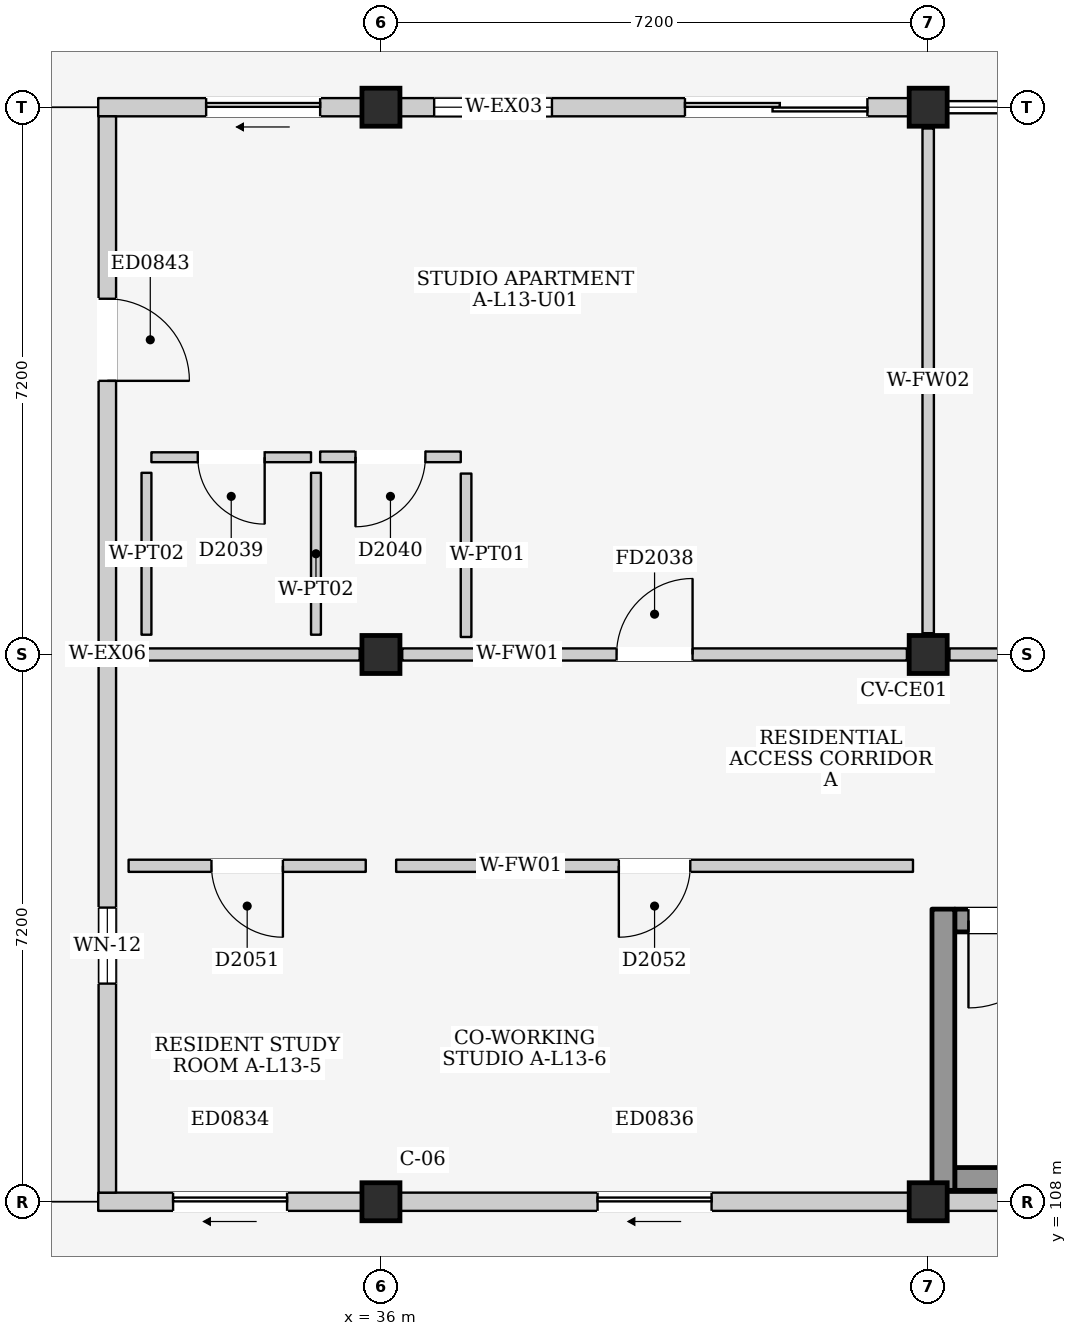
"""IFC4 building model, lengths in metres.
Left out: names, types, materials, properties, quantities, classifications, styles, units other than length and angle.
Written with IfcOpenShell. Run it as: python <this file> out.ifc"""

import sys

from ifc_helpers import new_model, si_unit, direction, frame, frame_2d, origin, origin_2d, place, context, subcontext, project, spatial, rectangle, extrude, element, fill, save


model = new_model("IFC4")
c1 = context("Model", 3, precision=1e-05, world=origin(), true_north=direction((0.0, 1.0)))
c2 = subcontext(c1, "Body", "Model", "MODEL_VIEW")
j1 = project(units=[si_unit("LENGTHUNIT", "METRE"), si_unit("PLANEANGLEUNIT", "RADIAN")], contexts=[c1])
p1 = place(None, origin())
s1 = spatial("IfcSite", under=j1, at=p1, CompositionType="ELEMENT")
p2 = place(p1, origin())
s2 = spatial("IfcBuilding", under=s1, at=p2, CompositionType="ELEMENT")
p3 = place(p2, frame((0.0, 0.0, 44.4)))
s3 = spatial("IfcBuildingStorey", under=s2, at=p3, CompositionType="ELEMENT", Elevation=44.4)
for number, where, z_axis, x_axis in (
    (1, (36.0, 108.0, 0.0), (0.0, 0.0, 1.0), (1.0, 0.0, 0.0)),
    (2, (36.0, 115.2, 0.0), (0.0, 0.0, 1.0), (1.0, 0.0, 0.0)),
    (3, (36.0, 122.4, 0.0), (0.0, 0.0, 1.0), (1.0, 0.0, 0.0)),
    (4, (43.2, 108.0, 0.0), (0.0, 0.0, 1.0), (1.0, 0.0, 0.0)),
    (5, (43.2, 115.2, 0.0), (0.0, 0.0, 1.0), (1.0, 0.0, 0.0)),
    (6, (43.2, 122.4, 0.0), (0.0, 0.0, 1.0), (1.0, 0.0, 0.0)),
):
    element("IfcColumn", number, at=place(p3, frame(where, z_axis=z_axis, x_axis=x_axis)), inside=s3, PredefinedType="COLUMN", context=c2, shape_type="SweptSolid", body=[
        extrude(rectangle(XDim=0.5, YDim=0.5, at=origin_2d()), origin(), (0.0, 0.0, 1.0), 3.3),
    ])
p4 = place(p3, frame((32.28, 122.4, 0.0), z_axis=(0.0, 0.0, 1.0), x_axis=(1.0, 0.0, 0.0)))
e7 = element("IfcWall", 7, at=p4, inside=s3, PredefinedType="ELEMENTEDWALL", context=c2, shape_type="SweptSolid", body=[
    extrude(rectangle(XDim=3.47, YDim=0.24, at=frame_2d((1.735, 0.0))), origin(), (0.0, 0.0, 1.0), 2.415),
])
p5 = place(p4, frame((1.42, 0.0, 0.0)))
e8 = element("IfcOpeningElement", 8, at=p5, cuts=e7, PredefinedType="OPENING", context=c2, shape_type="SweptSolid", body=[
    extrude(rectangle(XDim=1.5, YDim=2.12, at=frame_2d((0.75, 1.06))), frame((0.0, 0.135, 0.0), z_axis=(0.0, -1.0, 0.0), x_axis=(1.0, 0.0, 0.0)), (0.0, 0.0, 1.0), 0.27),
])
p6 = place(p3, frame((32.28, 108.0, 0.0), z_axis=(0.0, 0.0, 1.0), x_axis=(1.0, 0.0, 0.0)))
e9 = element("IfcWall", 9, at=p6, inside=s3, PredefinedType="ELEMENTEDWALL", context=c2, shape_type="SweptSolid", body=[
    extrude(rectangle(XDim=3.47, YDim=0.24, at=frame_2d((1.735, 0.0))), origin(), (0.0, 0.0, 1.0), 2.415),
])
p7 = place(p6, frame((0.985, 0.0, 0.0)))
e10 = element("IfcOpeningElement", 10, at=p7, cuts=e9, PredefinedType="OPENING", context=c2, shape_type="SweptSolid", body=[
    extrude(rectangle(XDim=1.5, YDim=2.12, at=frame_2d((0.75, 1.06))), frame((0.0, 0.135, 0.0), z_axis=(0.0, -1.0, 0.0), x_axis=(1.0, 0.0, 0.0)), (0.0, 0.0, 1.0), 0.27),
])
p8 = place(p3, frame((36.25, 122.4, 0.0), z_axis=(0.0, 0.0, 1.0), x_axis=(1.0, 0.0, 0.0)))
e11 = element("IfcWall", 11, at=p8, inside=s3, PredefinedType="ELEMENTEDWALL", context=c2, shape_type="SweptSolid", body=[
    extrude(rectangle(XDim=6.7, YDim=0.24, at=frame_2d((3.35, 0.0))), origin(), (0.0, 0.0, 1.0), 2.615),
])
p9 = place(p8, frame((3.75, 0.0, 0.0)))
e12 = element("IfcOpeningElement", 12, at=p9, cuts=e11, PredefinedType="OPENING", context=c2, shape_type="SweptSolid", body=[
    extrude(rectangle(XDim=2.4, YDim=2.12, at=frame_2d((1.2, 1.06))), frame((0.0, 0.135, 0.0), z_axis=(0.0, -1.0, 0.0), x_axis=(1.0, 0.0, 0.0)), (0.0, 0.0, 1.0), 0.27),
])
p10 = place(p8, frame((0.45, 0.0, 0.9)))
e13 = element("IfcOpeningElement", 13, at=p10, cuts=e11, PredefinedType="OPENING", context=c2, shape_type="SweptSolid", body=[
    extrude(rectangle(XDim=1.55, YDim=1.45, at=frame_2d((0.775, 0.725))), frame((0.0, 0.135, 0.0), z_axis=(0.0, -1.0, 0.0), x_axis=(1.0, 0.0, 0.0)), (0.0, 0.0, 1.0), 0.27),
])
p11 = place(p3, frame((36.25, 108.0, 0.0), z_axis=(0.0, 0.0, 1.0), x_axis=(1.0, 0.0, 0.0)))
e14 = element("IfcWall", 14, at=p11, inside=s3, PredefinedType="ELEMENTEDWALL", context=c2, shape_type="SweptSolid", body=[
    extrude(rectangle(XDim=6.7, YDim=0.24, at=frame_2d((3.35, 0.0))), origin(), (0.0, 0.0, 1.0), 2.415),
])
p12 = place(p11, frame((2.6, 0.0, 0.0)))
e15 = element("IfcOpeningElement", 15, at=p12, cuts=e14, PredefinedType="OPENING", context=c2, shape_type="SweptSolid", body=[
    extrude(rectangle(XDim=1.5, YDim=2.12, at=frame_2d((0.75, 1.06))), frame((0.0, 0.135, 0.0), z_axis=(0.0, -1.0, 0.0), x_axis=(1.0, 0.0, 0.0)), (0.0, 0.0, 1.0), 0.27),
])
p13 = place(p3, frame((43.45, 108.0, 0.0), z_axis=(0.0, 0.0, 1.0), x_axis=(1.0, 0.0, 0.0)))
e16 = element("IfcWall", 16, at=p13, inside=s3, PredefinedType="ELEMENTEDWALL", context=c2, shape_type="SweptSolid", body=[
    extrude(rectangle(XDim=6.7, YDim=0.24, at=frame_2d((3.35, 0.0))), origin(), (0.0, 0.0, 1.0), 2.415),
])
p14 = place(p13, frame((2.85, 0.0, 1.2)))
e17 = element("IfcOpeningElement", 17, at=p14, cuts=e16, PredefinedType="OPENING", context=c2, shape_type="SweptSolid", body=[
    extrude(rectangle(XDim=1.0, YDim=0.9, at=frame_2d((0.5, 0.45))), frame((0.0, 0.135, 0.0), z_axis=(0.0, -1.0, 0.0), x_axis=(1.0, 0.0, 0.0)), (0.0, 0.0, 1.0), 0.27),
])
p15 = place(p3, frame((32.4, 108.12, 0.0), z_axis=(0.0, 0.0, 1.0), x_axis=(0.0, 1.0, 0.0)))
e18 = element("IfcWall", 18, at=p15, inside=s3, PredefinedType="ELEMENTEDWALL", context=c2, shape_type="SweptSolid", body=[
    extrude(rectangle(XDim=7.08, YDim=0.23, at=frame_2d((3.54, 0.0))), origin(), (0.0, 0.0, 1.0), 2.515),
])
p16 = place(p15, frame((2.75, 0.0, 1.1)))
e19 = element("IfcOpeningElement", 19, at=p16, cuts=e18, PredefinedType="OPENING", context=c2, shape_type="SweptSolid", body=[
    extrude(rectangle(XDim=1.0, YDim=0.9, at=frame_2d((0.5, 0.45))), frame((0.0, 0.13, 0.0), z_axis=(0.0, -1.0, 0.0), x_axis=(1.0, 0.0, 0.0)), (0.0, 0.0, 1.0), 0.26),
])
p17 = place(p3, frame((32.4, 115.2, 0.0), z_axis=(0.0, 0.0, 1.0), x_axis=(0.0, 1.0, 0.0)))
e20 = element("IfcWall", 20, at=p17, inside=s3, PredefinedType="ELEMENTEDWALL", context=c2, shape_type="SweptSolid", body=[
    extrude(rectangle(XDim=7.08, YDim=0.23, at=frame_2d((3.54, 0.0))), origin(), (0.0, 0.0, 1.0), 2.515),
])
p18 = place(p17, frame((3.6, 0.0, 0.0)))
e21 = element("IfcOpeningElement", 21, at=p18, cuts=e20, PredefinedType="OPENING", context=c2, shape_type="SweptSolid", body=[
    extrude(rectangle(XDim=1.08, YDim=2.12, at=frame_2d((0.54, 1.06))), frame((0.0, 0.13, 0.0), z_axis=(0.0, -1.0, 0.0), x_axis=(1.0, 0.0, 0.0)), (0.0, 0.0, 1.0), 0.26),
])
p19 = place(p3, frame((43.55, 108.3, 0.0), z_axis=(0.0, 0.0, 1.0), x_axis=(1.0, 0.0, 0.0)))
e22 = element("IfcWall", 22, at=p19, inside=s3, PredefinedType="SHEAR", context=c2, shape_type="SweptSolid", body=[
    extrude(rectangle(XDim=6.5, YDim=0.3, at=frame_2d((3.25, 0.0))), origin(), (0.0, 0.0, 1.0), 3.08),
])
p20 = place(p3, frame((43.55, 111.7, 0.0), z_axis=(0.0, 0.0, 1.0), x_axis=(1.0, 0.0, 0.0)))
e23 = element("IfcWall", 23, at=p20, inside=s3, PredefinedType="SHEAR", context=c2, shape_type="SweptSolid", body=[
    extrude(rectangle(XDim=6.5, YDim=0.3, at=frame_2d((3.25, 0.0))), origin(), (0.0, 0.0, 1.0), 3.08),
])
p21 = place(p20, frame((0.18, 0.0, 0.0)))
e24 = element("IfcOpeningElement", 24, at=p21, cuts=e23, PredefinedType="OPENING", context=c2, shape_type="SweptSolid", body=[
    extrude(rectangle(XDim=1.15, YDim=2.2, at=frame_2d((0.575, 1.1))), frame((0.0, 0.165, 0.0), z_axis=(0.0, -1.0, 0.0), x_axis=(1.0, 0.0, 0.0)), (0.0, 0.0, 1.0), 0.33),
])
p22 = place(p3, frame((43.4, 108.15, 0.0), z_axis=(0.0, 0.0, 1.0), x_axis=(0.0, 1.0, 0.0)))
e25 = element("IfcWall", 25, at=p22, inside=s3, PredefinedType="SHEAR", context=c2, shape_type="SweptSolid", body=[
    extrude(rectangle(XDim=3.7, YDim=0.3, at=frame_2d((1.85, 0.0))), origin(), (0.0, 0.0, 1.0), 3.08),
])
p23 = place(p3, frame((32.68, 115.2, 0.0), z_axis=(0.0, 0.0, 1.0), x_axis=(1.0, 0.0, 0.0)))
e26 = element("IfcWall", 26, at=p23, inside=s3, PredefinedType="PARTITIONING", context=c2, shape_type="SweptSolid", body=[
    extrude(rectangle(XDim=3.04, YDim=0.16, at=frame_2d((1.52, 0.0))), origin(), (0.0, 0.0, 1.0), 2.415),
])
p24 = place(p3, frame((36.28, 115.2, 0.0), z_axis=(0.0, 0.0, 1.0), x_axis=(1.0, 0.0, 0.0)))
e27 = element("IfcWall", 27, at=p24, inside=s3, PredefinedType="PARTITIONING", context=c2, shape_type="SweptSolid", body=[
    extrude(rectangle(XDim=6.64, YDim=0.16, at=frame_2d((3.32, 0.0))), origin(), (0.0, 0.0, 1.0), 2.415),
])
p25 = place(p24, frame((2.82, 0.0, 0.0)))
e28 = element("IfcOpeningElement", 28, at=p25, cuts=e27, PredefinedType="OPENING", context=c2, shape_type="SweptSolid", body=[
    extrude(rectangle(XDim=1.0, YDim=2.15, at=frame_2d((0.5, 1.075))), frame((0.0, 0.095, 0.0), z_axis=(0.0, -1.0, 0.0), x_axis=(1.0, 0.0, 0.0)), (0.0, 0.0, 1.0), 0.19),
])
p26 = place(p3, frame((43.2, 115.48, 0.0), z_axis=(0.0, 0.0, 1.0), x_axis=(0.0, 1.0, 0.0)))
e29 = element("IfcWall", 29, at=p26, inside=s3, PredefinedType="PARTITIONING", context=c2, shape_type="SweptSolid", body=[
    extrude(rectangle(XDim=6.64, YDim=0.15, at=frame_2d((3.32, 0.0))), origin(), (0.0, 0.0, 1.0), 2.565),
])
p27 = place(p3, frame((32.98, 117.795, 0.0), z_axis=(0.0, 0.0, 1.0), x_axis=(1.0, 0.0, 0.0)))
e30 = element("IfcWall", 30, at=p27, inside=s3, PredefinedType="PARTITIONING", context=c2, shape_type="SweptSolid", body=[
    extrude(rectangle(XDim=2.1, YDim=0.13, at=frame_2d((1.05, 0.0))), origin(), (0.0, 0.0, 1.0), 3.08),
])
p28 = place(p27, frame((0.61, 0.0, 0.0)))
e31 = element("IfcOpeningElement", 31, at=p28, cuts=e30, PredefinedType="OPENING", context=c2, shape_type="SweptSolid", body=[
    extrude(rectangle(XDim=0.88, YDim=2.1, at=frame_2d((0.44, 1.05))), frame((0.0, 0.08, 0.0), z_axis=(0.0, -1.0, 0.0), x_axis=(1.0, 0.0, 0.0)), (0.0, 0.0, 1.0), 0.16),
])
for number, where, z_axis, x_axis in (
    (32, (35.145, 115.46, 0.0), (0.0, 0.0, 1.0), (0.0, 1.0, 0.0)),
    (33, (32.915, 115.46, 0.0), (0.0, 0.0, 1.0), (0.0, 1.0, 0.0)),
):
    element("IfcWall", number, at=place(p3, frame(where, z_axis=z_axis, x_axis=x_axis)), inside=s3, PredefinedType="PARTITIONING", context=c2, shape_type="SweptSolid", body=[
        extrude(rectangle(XDim=2.13, YDim=0.13, at=frame_2d((1.065, 0.0))), origin(), (0.0, 0.0, 1.0), 3.08),
    ])
p29 = place(p3, frame((35.2, 117.8, 0.0), z_axis=(0.0, 0.0, 1.0), x_axis=(1.0, 0.0, 0.0)))
e34 = element("IfcWall", 34, at=p29, inside=s3, PredefinedType="PARTITIONING", context=c2, shape_type="SweptSolid", body=[
    extrude(rectangle(XDim=1.85, YDim=0.14, at=frame_2d((0.925, 0.0))), origin(), (0.0, 0.0, 1.0), 3.08),
])
p30 = place(p29, frame((0.465, 0.0, 0.0)))
e35 = element("IfcOpeningElement", 35, at=p30, cuts=e34, PredefinedType="OPENING", context=c2, shape_type="SweptSolid", body=[
    extrude(rectangle(XDim=0.92, YDim=2.1, at=frame_2d((0.46, 1.05))), frame((0.0, 0.085, 0.0), z_axis=(0.0, -1.0, 0.0), x_axis=(1.0, 0.0, 0.0)), (0.0, 0.0, 1.0), 0.17),
])
p31 = place(p3, frame((37.12, 115.43, 0.0), z_axis=(0.0, 0.0, 1.0), x_axis=(0.0, 1.0, 0.0)))
e36 = element("IfcWall", 36, at=p31, inside=s3, PredefinedType="PARTITIONING", context=c2, shape_type="SweptSolid", body=[
    extrude(rectangle(XDim=2.15, YDim=0.14, at=frame_2d((1.075, 0.0))), origin(), (0.0, 0.0, 1.0), 3.08),
])
p32 = place(p3, frame((43.48, 115.2, 0.0), z_axis=(0.0, 0.0, 1.0), x_axis=(1.0, 0.0, 0.0)))
e37 = element("IfcWall", 37, at=p32, inside=s3, PredefinedType="PARTITIONING", context=c2, shape_type="SweptSolid", body=[
    extrude(rectangle(XDim=6.64, YDim=0.16, at=frame_2d((3.32, 0.0))), origin(), (0.0, 0.0, 1.0), 2.415),
])
p33 = place(p32, frame((2.795, 0.0, 0.0)))
e38 = element("IfcOpeningElement", 38, at=p33, cuts=e37, PredefinedType="OPENING", context=c2, shape_type="SweptSolid", body=[
    extrude(rectangle(XDim=1.05, YDim=2.2, at=frame_2d((0.525, 1.1))), frame((0.0, 0.095, 0.0), z_axis=(0.0, -1.0, 0.0), x_axis=(1.0, 0.0, 0.0)), (0.0, 0.0, 1.0), 0.19),
])
p34 = place(p3, frame((32.68, 112.42, 0.0), z_axis=(0.0, 0.0, 1.0), x_axis=(1.0, 0.0, 0.0)))
e39 = element("IfcWall", 39, at=p34, inside=s3, PredefinedType="PARTITIONING", context=c2, shape_type="SweptSolid", body=[
    extrude(rectangle(XDim=3.12, YDim=0.16, at=frame_2d((1.56, 0.0))), origin(), (0.0, 0.0, 1.0), 3.08),
])
p35 = place(p34, frame((1.09, 0.0, 0.0)))
e40 = element("IfcOpeningElement", 40, at=p35, cuts=e39, PredefinedType="OPENING", context=c2, shape_type="SweptSolid", body=[
    extrude(rectangle(XDim=0.94, YDim=2.12, at=frame_2d((0.47, 1.06))), frame((0.0, 0.095, 0.0), z_axis=(0.0, -1.0, 0.0), x_axis=(1.0, 0.0, 0.0)), (0.0, 0.0, 1.0), 0.19),
])
p36 = place(p3, frame((36.2, 112.42, 0.0), z_axis=(0.0, 0.0, 1.0), x_axis=(1.0, 0.0, 0.0)))
e41 = element("IfcWall", 41, at=p36, inside=s3, PredefinedType="PARTITIONING", context=c2, shape_type="SweptSolid", body=[
    extrude(rectangle(XDim=6.8, YDim=0.16, at=frame_2d((3.4, 0.0))), origin(), (0.0, 0.0, 1.0), 3.08),
])
p37 = place(p36, frame((2.93, 0.0, 0.0)))
e42 = element("IfcOpeningElement", 42, at=p37, cuts=e41, PredefinedType="OPENING", context=c2, shape_type="SweptSolid", body=[
    extrude(rectangle(XDim=0.94, YDim=2.12, at=frame_2d((0.47, 1.06))), frame((0.0, 0.095, 0.0), z_axis=(0.0, -1.0, 0.0), x_axis=(1.0, 0.0, 0.0)), (0.0, 0.0, 1.0), 0.19),
])
p38 = place(p5, frame((1.5, 0.0, 0.0), z_axis=(0.0, 0.0, 1.0), x_axis=(-1.0, 0.0, 0.0)))
e43 = element("IfcDoor", 43, at=p38, inside=s3, OperationType="SLIDING_TO_LEFT", PredefinedType="DOOR", context=c2, shape_type="SweptSolid", body=[
    extrude(rectangle(XDim=1.5, YDim=2.12, at=frame_2d((0.75, 1.06))), frame((0.0, 0.025, 0.0), z_axis=(0.0, -1.0, 0.0), x_axis=(1.0, 0.0, 0.0)), (0.0, 0.0, 1.0), 0.05),
])
fill(e8, e43)
p39 = place(p7, frame((1.5, 0.0, 0.0), z_axis=(0.0, 0.0, 1.0), x_axis=(-1.0, 0.0, 0.0)))
e44 = element("IfcDoor", 44, at=p39, inside=s3, OperationType="SLIDING_TO_LEFT", PredefinedType="DOOR", context=c2, shape_type="SweptSolid", body=[
    extrude(rectangle(XDim=1.5, YDim=2.12, at=frame_2d((0.75, 1.06))), frame((0.0, 0.025, 0.0), z_axis=(0.0, -1.0, 0.0), x_axis=(1.0, 0.0, 0.0)), (0.0, 0.0, 1.0), 0.05),
])
fill(e10, e44)
p40 = place(p9, frame((2.4, 0.0, 0.0), z_axis=(0.0, 0.0, 1.0), x_axis=(-1.0, 0.0, 0.0)))
e45 = element("IfcDoor", 45, at=p40, inside=s3, OperationType="DOUBLE_DOOR_SLIDING", PredefinedType="DOOR", context=c2, shape_type="SweptSolid", body=[
    extrude(rectangle(XDim=2.4, YDim=2.12, at=frame_2d((1.2, 1.06))), frame((0.0, 0.025, 0.0), z_axis=(0.0, -1.0, 0.0), x_axis=(1.0, 0.0, 0.0)), (0.0, 0.0, 1.0), 0.05),
])
fill(e12, e45)
p41 = place(p10, origin())
e46 = element("IfcWindow", 46, at=p41, inside=s3, PartitioningType="DOUBLE_PANEL_VERTICAL", PredefinedType="WINDOW", context=c2, shape_type="SweptSolid", body=[
    extrude(rectangle(XDim=1.55, YDim=1.45, at=frame_2d((0.775, 0.725))), frame((0.0, 0.03, 0.0), z_axis=(0.0, -1.0, 0.0), x_axis=(1.0, 0.0, 0.0)), (0.0, 0.0, 1.0), 0.06),
])
fill(e13, e46)
p42 = place(p12, frame((1.5, 0.0, 0.0), z_axis=(0.0, 0.0, 1.0), x_axis=(-1.0, 0.0, 0.0)))
e47 = element("IfcDoor", 47, at=p42, inside=s3, OperationType="SLIDING_TO_LEFT", PredefinedType="DOOR", context=c2, shape_type="SweptSolid", body=[
    extrude(rectangle(XDim=1.5, YDim=2.12, at=frame_2d((0.75, 1.06))), frame((0.0, 0.025, 0.0), z_axis=(0.0, -1.0, 0.0), x_axis=(1.0, 0.0, 0.0)), (0.0, 0.0, 1.0), 0.05),
])
fill(e15, e47)
p43 = place(p16, origin())
e48 = element("IfcWindow", 48, at=p43, inside=s3, PartitioningType="SINGLE_PANEL", PredefinedType="WINDOW", context=c2, shape_type="SweptSolid", body=[
    extrude(rectangle(XDim=1.0, YDim=0.9, at=frame_2d((0.5, 0.45))), frame((0.0, 0.03, 0.0), z_axis=(0.0, -1.0, 0.0), x_axis=(1.0, 0.0, 0.0)), (0.0, 0.0, 1.0), 0.06),
])
fill(e19, e48)
p44 = place(p18, frame((1.08, 0.0, 0.0), z_axis=(0.0, 0.0, 1.0), x_axis=(-1.0, 0.0, 0.0)))
e49 = element("IfcDoor", 49, at=p44, inside=s3, OperationType="SINGLE_SWING_RIGHT", PredefinedType="DOOR", context=c2, shape_type="SweptSolid", body=[
    extrude(rectangle(XDim=1.08, YDim=2.12, at=frame_2d((0.54, 1.06))), frame((0.0, 0.025, 0.0), z_axis=(0.0, -1.0, 0.0), x_axis=(1.0, 0.0, 0.0)), (0.0, 0.0, 1.0), 0.05),
])
fill(e21, e49)
p45 = place(p21, frame((1.15, 0.0, 0.0), z_axis=(0.0, 0.0, 1.0), x_axis=(-1.0, 0.0, 0.0)))
e50 = element("IfcDoor", 50, at=p45, inside=s3, OperationType="SINGLE_SWING_RIGHT", PredefinedType="DOOR", context=c2, shape_type="SweptSolid", body=[
    extrude(rectangle(XDim=1.15, YDim=2.2, at=frame_2d((0.575, 1.1))), frame((0.0, 0.025, 0.0), z_axis=(0.0, -1.0, 0.0), x_axis=(1.0, 0.0, 0.0)), (0.0, 0.0, 1.0), 0.05),
])
fill(e24, e50)
p46 = place(p25, origin())
e51 = element("IfcDoor", 51, at=p46, inside=s3, OperationType="SINGLE_SWING_RIGHT", PredefinedType="DOOR", context=c2, shape_type="SweptSolid", body=[
    extrude(rectangle(XDim=1.0, YDim=2.15, at=frame_2d((0.5, 1.075))), frame((0.0, 0.025, 0.0), z_axis=(0.0, -1.0, 0.0), x_axis=(1.0, 0.0, 0.0)), (0.0, 0.0, 1.0), 0.05),
])
fill(e28, e51)
p47 = place(p28, frame((0.88, 0.0, 0.0), z_axis=(0.0, 0.0, 1.0), x_axis=(-1.0, 0.0, 0.0)))
e52 = element("IfcDoor", 52, at=p47, inside=s3, OperationType="SINGLE_SWING_LEFT", PredefinedType="DOOR", context=c2, shape_type="SweptSolid", body=[
    extrude(rectangle(XDim=0.88, YDim=2.1, at=frame_2d((0.44, 1.05))), frame((0.0, 0.025, 0.0), z_axis=(0.0, -1.0, 0.0), x_axis=(1.0, 0.0, 0.0)), (0.0, 0.0, 1.0), 0.05),
])
fill(e31, e52)
p48 = place(p30, frame((0.92, 0.0, 0.0), z_axis=(0.0, 0.0, 1.0), x_axis=(-1.0, 0.0, 0.0)))
e53 = element("IfcDoor", 53, at=p48, inside=s3, OperationType="SINGLE_SWING_RIGHT", PredefinedType="DOOR", context=c2, shape_type="SweptSolid", body=[
    extrude(rectangle(XDim=0.92, YDim=2.1, at=frame_2d((0.46, 1.05))), frame((0.0, 0.025, 0.0), z_axis=(0.0, -1.0, 0.0), x_axis=(1.0, 0.0, 0.0)), (0.0, 0.0, 1.0), 0.05),
])
fill(e35, e53)
p49 = place(p35, frame((0.94, 0.0, 0.0), z_axis=(0.0, 0.0, 1.0), x_axis=(-1.0, 0.0, 0.0)))
e54 = element("IfcDoor", 54, at=p49, inside=s3, OperationType="SINGLE_SWING_LEFT", PredefinedType="DOOR", context=c2, shape_type="SweptSolid", body=[
    extrude(rectangle(XDim=0.94, YDim=2.12, at=frame_2d((0.47, 1.06))), frame((0.0, 0.025, 0.0), z_axis=(0.0, -1.0, 0.0), x_axis=(1.0, 0.0, 0.0)), (0.0, 0.0, 1.0), 0.05),
])
fill(e40, e54)
p50 = place(p37, frame((0.94, 0.0, 0.0), z_axis=(0.0, 0.0, 1.0), x_axis=(-1.0, 0.0, 0.0)))
e55 = element("IfcDoor", 55, at=p50, inside=s3, OperationType="SINGLE_SWING_RIGHT", PredefinedType="DOOR", context=c2, shape_type="SweptSolid", body=[
    extrude(rectangle(XDim=0.94, YDim=2.12, at=frame_2d((0.47, 1.06))), frame((0.0, 0.025, 0.0), z_axis=(0.0, -1.0, 0.0), x_axis=(1.0, 0.0, 0.0)), (0.0, 0.0, 1.0), 0.05),
])
fill(e42, e55)
save(model, sys.argv[1])
